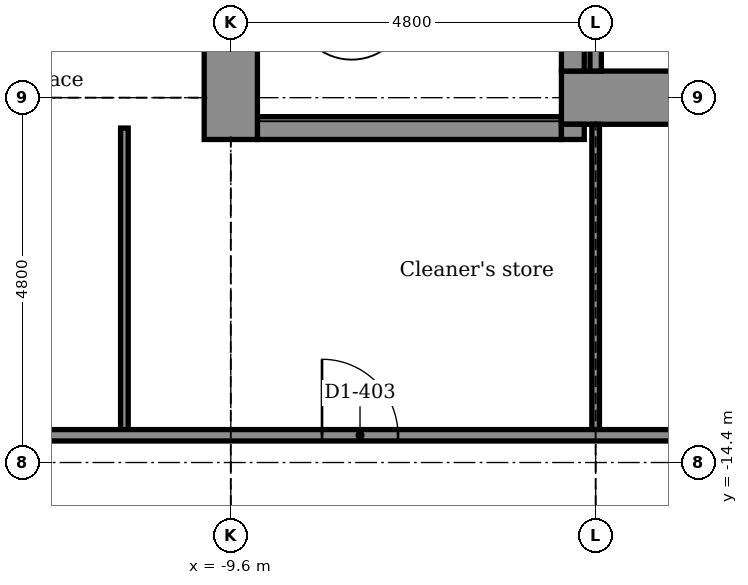
"""IFC4 building model, lengths in metres.
Left out: names, types, materials, properties, quantities, classifications, styles, units other than length and angle.
Written with IfcOpenShell. Run it as: python <this file> out.ifc"""

import sys

from ifc_helpers import new_model, si_unit, direction, frame, frame_2d, origin, place, context, subcontext, project, spatial, rectangle, extrude, element, fill, save


model = new_model("IFC4")
c1 = context("Model", 3, precision=1e-05, world=origin(), true_north=direction((0.0, 1.0)))
c2 = subcontext(c1, "Body", "Model", "MODEL_VIEW")
j1 = project(units=[si_unit("LENGTHUNIT", "METRE"), si_unit("PLANEANGLEUNIT", "RADIAN")], contexts=[c1])
p1 = place(None, origin())
s1 = spatial("IfcSite", under=j1, at=p1, CompositionType="ELEMENT")
p2 = place(p1, origin())
s2 = spatial("IfcBuilding", under=s1, at=p2, CompositionType="ELEMENT")
p3 = place(p2, frame((0.0, 0.0, 138.8)))
s3 = spatial("IfcBuildingStorey", under=s2, at=p3, CompositionType="ELEMENT", Elevation=138.8)
p4 = place(p3, frame((-9.25, -10.0, -0.15), z_axis=(0.0, 0.0, 1.0), x_axis=(1.0, 0.0, 0.0)))
e1 = element("IfcWall", 1, at=p4, inside=s3, PredefinedType="STANDARD", context=c2, shape_type="SweptSolid", body=[
    extrude(rectangle(XDim=4.0, YDim=0.3, at=frame_2d((2.0, 0.0))), origin(), (0.0, 0.0, 1.0), 3.9),
])
p5 = place(p3, frame((-5.25, -9.6, -0.15), z_axis=(0.0, 0.0, 1.0), x_axis=(1.0, 0.0, 0.0)))
e2 = element("IfcWall", 2, at=p5, inside=s3, PredefinedType="SHEAR", context=c2, shape_type="SweptSolid", body=[
    extrude(rectangle(XDim=10.2, YDim=0.7, at=frame_2d((5.1, 0.0))), origin(), (0.0, 0.0, 1.0), 3.9),
])
p6 = place(p5, frame((9.0, 0.0, 0.15)))
e3 = element("IfcOpeningElement", 3, at=p6, cuts=e2, PredefinedType="OPENING", context=c2, shape_type="SweptSolid", body=[
    extrude(rectangle(XDim=0.9, YDim=2.1, at=frame_2d((0.45, 1.05))), frame((0.0, 0.36, 0.0), z_axis=(0.0, -1.0, 0.0), x_axis=(1.0, 0.0, 0.0)), (0.0, 0.0, 1.0), 0.72),
])
p7 = place(p3, frame((-9.6, -10.15, -0.15), z_axis=(0.0, 0.0, 1.0), x_axis=(0.0, 1.0, 0.0)))
e4 = element("IfcWall", 4, at=p7, inside=s3, PredefinedType="SHEAR", context=c2, shape_type="SweptSolid", body=[
    extrude(rectangle(XDim=7.6, YDim=0.7, at=frame_2d((3.8, 0.0))), origin(), (0.0, 0.0, 1.0), 3.9),
])
p8 = place(p3, frame((-5.1, -10.15, -0.15), z_axis=(0.0, 0.0, 1.0), x_axis=(0.0, 1.0, 0.0)))
e5 = element("IfcWall", 5, at=p8, inside=s3, PredefinedType="STANDARD", context=c2, shape_type="SweptSolid", body=[
    extrude(rectangle(XDim=0.2, YDim=0.3, at=frame_2d((0.1, 0.0))), origin(), (0.0, 0.0, 1.0), 3.9),
])
p9 = place(p3, frame((-5.1, -9.25, -0.15), z_axis=(0.0, 0.0, 1.0), x_axis=(0.0, 1.0, 0.0)))
e6 = element("IfcWall", 6, at=p9, inside=s3, PredefinedType="STANDARD", context=c2, shape_type="SweptSolid", body=[
    extrude(rectangle(XDim=7.0, YDim=0.3, at=frame_2d((3.5, 0.0))), origin(), (0.0, 0.0, 1.0), 3.9),
])
p10 = place(p9, frame((3.8, 0.0, 0.15)))
e7 = element("IfcOpeningElement", 7, at=p10, cuts=e6, PredefinedType="OPENING", context=c2, shape_type="SweptSolid", body=[
    extrude(rectangle(XDim=1.2, YDim=2.1, at=frame_2d((0.6, 1.05))), frame((0.0, 0.16, 0.0), z_axis=(0.0, -1.0, 0.0), x_axis=(1.0, 0.0, 0.0)), (0.0, 0.0, 1.0), 0.32),
])
p11 = place(p3, frame((-4.8, -14.042, 0.0), z_axis=(0.0, 0.0, 1.0), x_axis=(0.0, 1.0, 0.0)))
e8 = element("IfcWall", 8, at=p11, inside=s3, PredefinedType="PARTITIONING", context=c2, shape_type="SweptSolid", body=[
    extrude(rectangle(XDim=4.092, YDim=0.1, at=frame_2d((2.046, 0.0))), origin(), (0.0, 0.0, 1.0), 3.066),
])
p12 = place(p3, frame((-4.8, -9.25, 0.0), z_axis=(0.0, 0.0, 1.0), x_axis=(0.0, 1.0, 0.0)))
e9 = element("IfcWall", 9, at=p12, inside=s3, PredefinedType="PARTITIONING", context=c2, shape_type="SweptSolid", body=[
    extrude(rectangle(XDim=1.45, YDim=0.15, at=frame_2d((0.725, 0.0))), origin(), (0.0, 0.0, 1.0), 3.75),
])
p13 = place(p3, frame((-11.0, -14.042, 0.0), z_axis=(0.0, 0.0, 1.0), x_axis=(0.0, 1.0, 0.0)))
e10 = element("IfcWall", 10, at=p13, inside=s3, PredefinedType="PARTITIONING", context=c2, shape_type="SweptSolid", body=[
    extrude(rectangle(XDim=4.042, YDim=0.1, at=frame_2d((2.021, 0.0))), origin(), (0.0, 0.0, 1.0), 3.75),
])
p14 = place(p3, frame((-17.021, -14.042, 0.0), z_axis=(0.0, 0.0, 1.0), x_axis=(1.0, 0.0, 0.0)))
e11 = element("IfcWall", 11, at=p14, inside=s3, PredefinedType="PARTITIONING", context=c2, shape_type="SweptSolid", body=[
    extrude(rectangle(XDim=20.021, YDim=0.15, at=frame_2d((10.011, 0.0))), origin(), (0.0, 0.0, 1.0), 3.75),
])
p15 = place(p14, frame((8.621, 0.0, 0.0)))
e12 = element("IfcOpeningElement", 12, at=p15, cuts=e11, PredefinedType="OPENING", context=c2, shape_type="SweptSolid", body=[
    extrude(rectangle(XDim=1.0, YDim=2.1, at=frame_2d((0.5, 1.05))), frame((0.0, 0.085, 0.0), z_axis=(0.0, -1.0, 0.0), x_axis=(1.0, 0.0, 0.0)), (0.0, 0.0, 1.0), 0.17),
])
p16 = place(p14, frame((13.396, 0.0, 0.0)))
e13 = element("IfcOpeningElement", 13, at=p16, cuts=e11, PredefinedType="OPENING", context=c2, shape_type="SweptSolid", body=[
    extrude(rectangle(XDim=1.0, YDim=2.1, at=frame_2d((0.5, 1.05))), frame((0.0, 0.085, 0.0), z_axis=(0.0, -1.0, 0.0), x_axis=(1.0, 0.0, 0.0)), (0.0, 0.0, 1.0), 0.17),
])
p17 = place(p15, origin())
e14 = element("IfcDoor", 14, at=p17, inside=s3, OperationType="SINGLE_SWING_LEFT", PredefinedType="DOOR", context=c2, shape_type="SweptSolid", body=[
    extrude(rectangle(XDim=1.0, YDim=2.1, at=frame_2d((0.5, 1.05))), frame((0.0, 0.025, 0.0), z_axis=(0.0, -1.0, 0.0), x_axis=(1.0, 0.0, 0.0)), (0.0, 0.0, 1.0), 0.05),
])
fill(e12, e14)
save(model, sys.argv[1])
